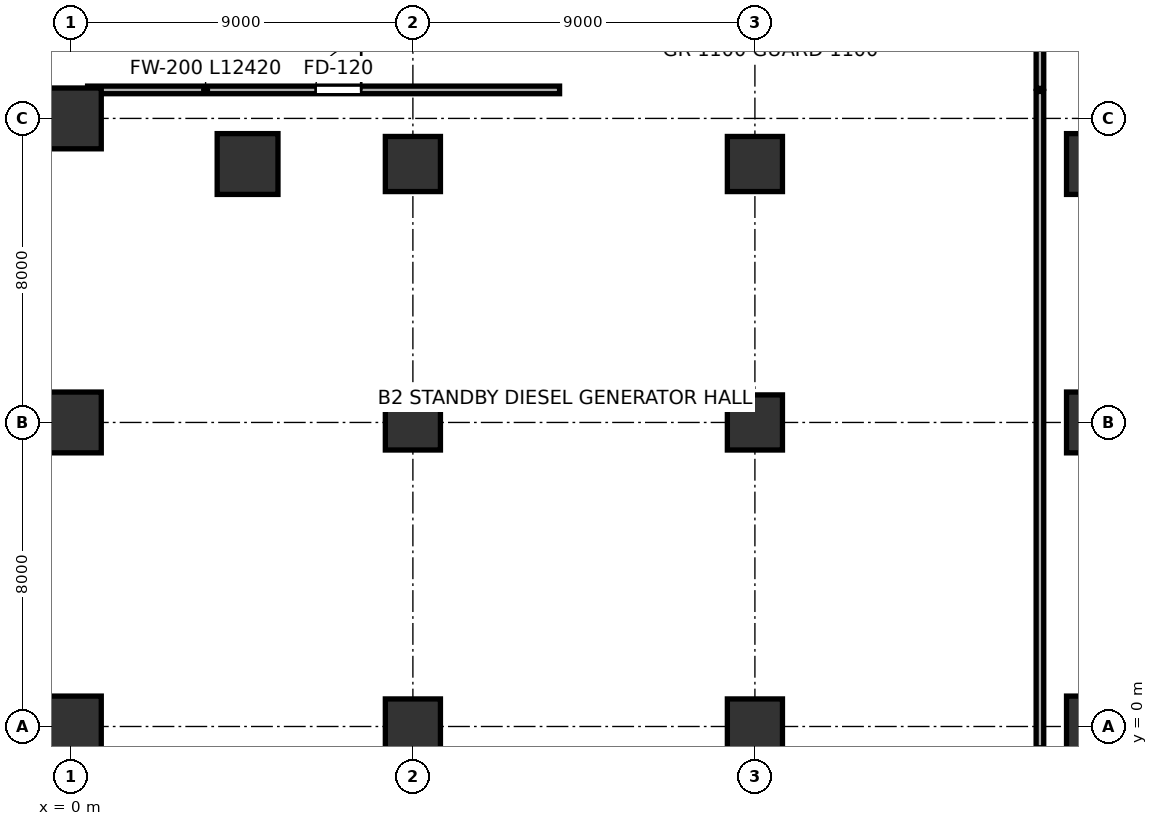
"""IFC4 building model, lengths in metres.
Left out: names, types, materials, properties, quantities, classifications, styles, units other than length and angle.
Written with IfcOpenShell. Run it as: python <this file> out.ifc"""

import sys

from ifc_helpers import new_model, si_unit, direction, frame, frame_2d, origin, origin_2d, place, context, subcontext, project, spatial, rectangle, extrude, source, transform, mapped, element, fill, save


model = new_model("IFC4")
c1 = context("Model", 3, precision=1e-05, world=origin(), true_north=direction((0.0, 1.0)))
c2 = subcontext(c1, "Body", "Model", "MODEL_VIEW")
j1 = project(units=[si_unit("LENGTHUNIT", "METRE"), si_unit("PLANEANGLEUNIT", "RADIAN")], contexts=[c1])
p1 = place(None, origin())
s1 = spatial("IfcSite", under=j1, at=p1, CompositionType="ELEMENT")
p2 = place(p1, origin())
s2 = spatial("IfcBuilding", under=s1, at=p2, CompositionType="ELEMENT")
p3 = place(p2, frame((0.0, 0.0, -9.6)))
s3 = spatial("IfcBuildingStorey", under=s2, at=p3, CompositionType="ELEMENT", Elevation=-9.6)
m1 = source(origin(), c2, "Body", "SweptSolid", [
    extrude(rectangle(XDim=1.6, YDim=1.6, at=origin_2d()), origin(), (0.0, 0.0, 1.0), 4.799),
])
for number, where, z_axis, x_axis in (
    (1, (0.0, 0.0, 0.0), (0.0, 0.0, 1.0), (1.0, 0.0, 0.0)),
    (2, (0.0, 8.0, 0.0), (0.0, 0.0, 1.0), (1.0, 0.0, 0.0)),
    (3, (0.0, 16.0, 0.0), (0.0, 0.0, 1.0), (1.0, 0.0, 0.0)),
):
    element("IfcColumn", number, at=place(p3, frame(where, z_axis=z_axis, x_axis=x_axis)), inside=s3, PredefinedType="COLUMN", context=c2, shape_type="MappedRepresentation", body=[
        mapped(m1, transform((0.0, 0.0, 0.0), scale=1.0)),
    ])
m2 = source(origin(), c2, "Body", "SweptSolid", [
    extrude(rectangle(XDim=1.45, YDim=1.45, at=origin_2d()), origin(), (0.0, 0.0, 1.0), 4.799),
])
p4 = place(p3, frame((9.0, 0.0, 0.0), z_axis=(0.0, 0.0, 1.0), x_axis=(1.0, 0.0, 0.0)))
e4 = element("IfcColumn", 4, at=p4, inside=s3, PredefinedType="COLUMN", context=c2, shape_type="MappedRepresentation", body=[
    mapped(m2, transform((0.0, 0.0, 0.0), scale=1.0)),
])
m3 = source(origin(), c2, "Body", "SweptSolid", [
    extrude(rectangle(XDim=1.45, YDim=1.45, at=origin_2d()), origin(), (0.0, 0.0, 1.0), 4.799),
])
for number, where, z_axis, x_axis in (
    (5, (9.0, 8.0, 0.0), (0.0, 0.0, 1.0), (1.0, 0.0, 0.0)),
    (6, (9.0, 14.8, 0.0), (0.0, 0.0, 1.0), (1.0, 0.0, 0.0)),
):
    element("IfcColumn", number, at=place(p3, frame(where, z_axis=z_axis, x_axis=x_axis)), inside=s3, PredefinedType="COLUMN", context=c2, shape_type="MappedRepresentation", body=[
        mapped(m3, transform((0.0, 0.0, 0.0), scale=1.0)),
    ])
p5 = place(p3, frame((18.0, 0.0, 0.0), z_axis=(0.0, 0.0, 1.0), x_axis=(1.0, 0.0, 0.0)))
e7 = element("IfcColumn", 7, at=p5, inside=s3, PredefinedType="COLUMN", context=c2, shape_type="MappedRepresentation", body=[
    mapped(m2, transform((0.0, 0.0, 0.0), scale=1.0)),
])
for number, where, z_axis, x_axis in (
    (8, (18.0, 8.0, 0.0), (0.0, 0.0, 1.0), (1.0, 0.0, 0.0)),
    (9, (18.0, 14.8, 0.0), (0.0, 0.0, 1.0), (1.0, 0.0, 0.0)),
):
    element("IfcColumn", number, at=place(p3, frame(where, z_axis=z_axis, x_axis=x_axis)), inside=s3, PredefinedType="COLUMN", context=c2, shape_type="MappedRepresentation", body=[
        mapped(m3, transform((0.0, 0.0, 0.0), scale=1.0)),
    ])
p6 = place(p3, frame((27.0, 0.0, 0.0), z_axis=(0.0, 0.0, 1.0), x_axis=(1.0, 0.0, 0.0)))
e10 = element("IfcColumn", 10, at=p6, inside=s3, PredefinedType="COLUMN", context=c2, shape_type="MappedRepresentation", body=[
    mapped(m1, transform((0.0, 0.0, 0.0), scale=1.0)),
])
m4 = source(origin(), c2, "Body", "SweptSolid", [
    extrude(rectangle(XDim=1.6, YDim=1.6, at=origin_2d()), origin(), (0.0, 0.0, 1.0), 4.799),
])
for number, where, z_axis, x_axis in (
    (11, (27.0, 8.0, 0.0), (0.0, 0.0, 1.0), (1.0, 0.0, 0.0)),
    (12, (27.0, 14.8, 0.0), (0.0, 0.0, 1.0), (1.0, 0.0, 0.0)),
    (13, (4.65, 14.8, 0.0), (0.0, 0.0, 1.0), (1.0, 0.0, 0.0)),
):
    element("IfcColumn", number, at=place(p3, frame(where, z_axis=z_axis, x_axis=x_axis)), inside=s3, PredefinedType="COLUMN", context=c2, shape_type="MappedRepresentation", body=[
        mapped(m4, transform((0.0, 0.0, 0.0), scale=1.0)),
    ])
p7 = place(p3, frame((0.44, 16.75, 0.0), z_axis=(0.0, 0.0, 1.0), x_axis=(1.0, 0.0, 0.0)))
e14 = element("IfcWall", 14, at=p7, inside=s3, PredefinedType="SOLIDWALL", context=c2, shape_type="SweptSolid", body=[
    extrude(rectangle(XDim=12.42, YDim=0.2, at=frame_2d((6.21, 0.0))), origin(), (0.0, 0.0, 1.0), 3.65),
])
p8 = place(p7, frame((6.0, 0.0, 0.0)))
e15 = element("IfcOpeningElement", 15, at=p8, cuts=e14, PredefinedType="OPENING", context=c2, shape_type="SweptSolid", body=[
    extrude(rectangle(XDim=1.2, YDim=2.2, at=frame_2d((0.6, 1.1))), frame((0.0, 0.11, 0.0), z_axis=(0.0, -1.0, 0.0), x_axis=(1.0, 0.0, 0.0)), (0.0, 0.0, 1.0), 0.22),
])
p9 = place(p3, frame((25.5, -0.56, 0.0), z_axis=(0.0, 0.0, 1.0), x_axis=(0.0, 1.0, 0.0)))
e16 = element("IfcWall", 16, at=p9, inside=s3, PredefinedType="SOLIDWALL", context=c2, shape_type="SweptSolid", body=[
    extrude(rectangle(XDim=17.27, YDim=0.2, at=frame_2d((8.635, 0.0))), origin(), (0.0, 0.0, 1.0), 3.65),
])
p10 = place(p3, frame((25.5, 16.79, 0.0), z_axis=(0.0, 0.0, 1.0), x_axis=(0.0, 1.0, 0.0)))
e17 = element("IfcWall", 17, at=p10, inside=s3, PredefinedType="SOLIDWALL", context=c2, shape_type="SweptSolid", body=[
    extrude(rectangle(XDim=5.22, YDim=0.2, at=frame_2d((2.61, 0.0))), origin(), (0.0, 0.0, 1.0), 4.52),
])
m5 = source(origin(), c2, "Body", "SweptSolid", [
    extrude(rectangle(XDim=1.2, YDim=2.2, at=frame_2d((0.6, 1.1))), frame((0.0, 0.025, 0.0), z_axis=(0.0, -1.0, 0.0), x_axis=(1.0, 0.0, 0.0)), (0.0, 0.0, 1.0), 0.05),
])
p11 = place(p8, origin())
e18 = element("IfcDoor", 18, at=p11, inside=s3, OperationType="SINGLE_SWING_RIGHT", PredefinedType="DOOR", context=c2, shape_type="MappedRepresentation", body=[
    mapped(m5, transform((0.0, 0.0, 0.0), scale=1.0)),
])
fill(e15, e18)
save(model, sys.argv[1])
